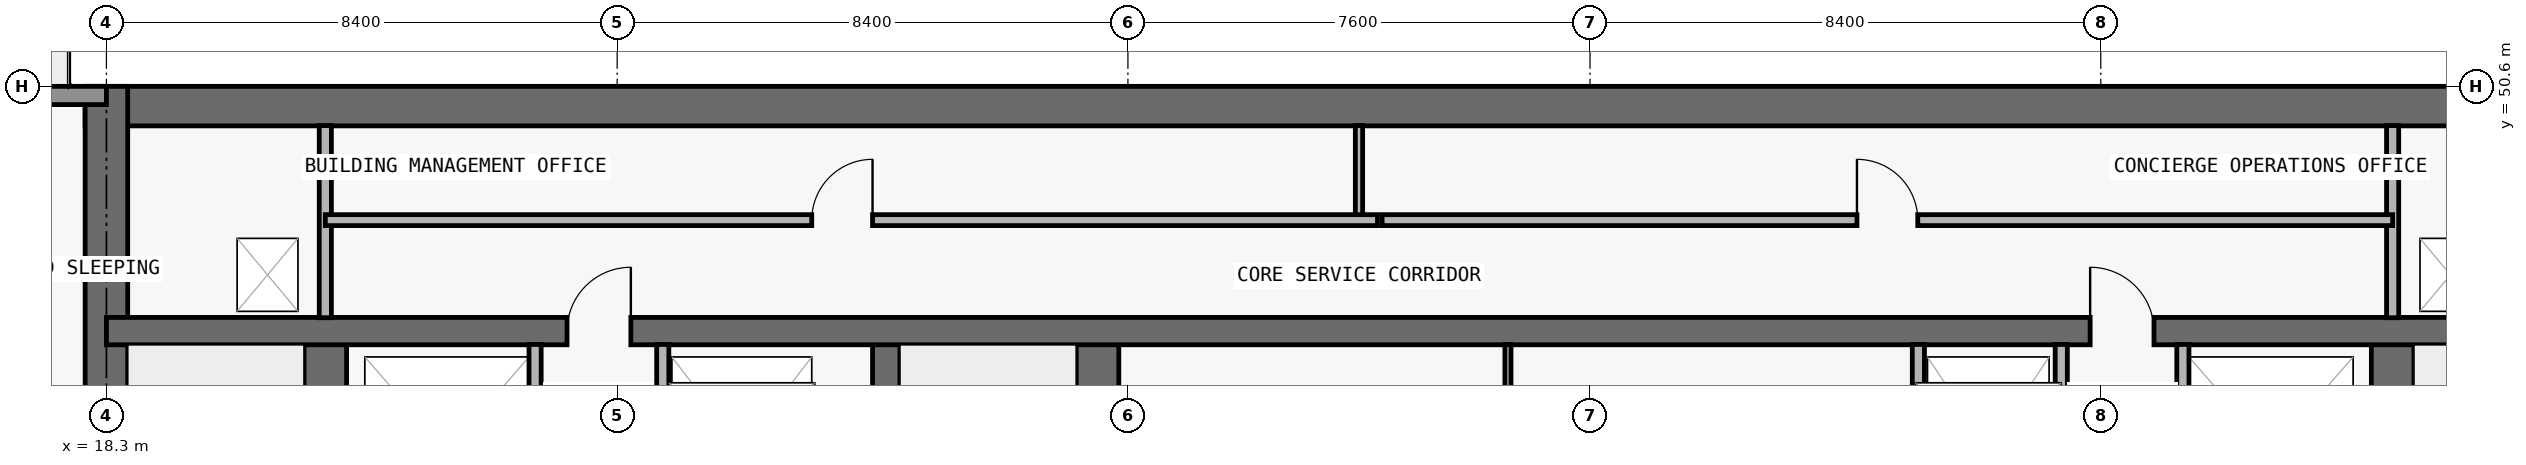
"""IFC4 building model, lengths in metres.
Left out: names, types, materials, properties, quantities, classifications, styles, units other than length and angle.
Written with IfcOpenShell. Run it as: python <this file> out.ifc"""

import sys

from ifc_helpers import new_model, si_unit, direction, frame, frame_2d, origin, place, context, subcontext, project, spatial, rectangle, extrude, element, fill, save


model = new_model("IFC4")
c1 = context("Model", 3, precision=1e-05, world=origin(), true_north=direction((0.0, 1.0)))
c2 = subcontext(c1, "Body", "Model", "MODEL_VIEW")
j1 = project(units=[si_unit("LENGTHUNIT", "METRE"), si_unit("PLANEANGLEUNIT", "RADIAN")], contexts=[c1])
p1 = place(None, origin())
s1 = spatial("IfcSite", under=j1, at=p1, CompositionType="ELEMENT")
p2 = place(p1, origin())
s2 = spatial("IfcBuilding", under=s1, at=p2, CompositionType="ELEMENT")
p3 = place(p2, frame((0.0, 0.0, 218.1)))
s3 = spatial("IfcBuildingStorey", under=s2, at=p3, CompositionType="ELEMENT", Elevation=218.1)
p4 = place(p3, frame((17.95, 50.275, 0.0), z_axis=(0.0, 0.0, 1.0), x_axis=(1.0, 0.0, 0.0)))
e1 = element("IfcWall", 1, at=p4, inside=s3, PredefinedType="SHEAR", context=c2, shape_type="SweptSolid", body=[
    extrude(rectangle(XDim=41.9, YDim=0.65, at=frame_2d((20.95, 0.0))), origin(), (0.0, 0.0, 1.0), 3.0),
])
p5 = place(p3, frame((18.3, 36.65, 0.0), z_axis=(0.0, 0.0, 1.0), x_axis=(0.0, 1.0, 0.0)))
e2 = element("IfcWall", 2, at=p5, inside=s3, PredefinedType="SHEAR", context=c2, shape_type="SweptSolid", body=[
    extrude(rectangle(XDim=13.95, YDim=0.7, at=frame_2d((6.975, 0.0))), origin(), (0.0, 0.0, 1.0), 3.0),
])
p6 = place(p3, frame((21.9, 37.0, 0.0), z_axis=(0.0, 0.0, 1.0), x_axis=(0.0, 1.0, 0.0)))
e3 = element("IfcWall", 3, at=p6, inside=s3, PredefinedType="SHEAR", context=c2, shape_type="SweptSolid", body=[
    extrude(rectangle(XDim=9.575, YDim=0.7, at=frame_2d((4.788, 0.0))), origin(), (0.0, 0.0, 1.0), 3.0),
])
p7 = place(p6, frame((0.55, 0.0, 0.0)))
e4 = element("IfcOpeningElement", 4, at=p7, cuts=e3, PredefinedType="OPENING", context=c2, shape_type="SweptSolid", body=[
    extrude(rectangle(XDim=1.1, YDim=2.15, at=frame_2d((0.55, 1.075))), frame((0.0, 0.36, 0.0), z_axis=(0.0, -1.0, 0.0), x_axis=(1.0, 0.0, 0.0)), (0.0, 0.0, 1.0), 0.72),
])
p8 = place(p3, frame((55.9, 37.0, 0.0), z_axis=(0.0, 0.0, 1.0), x_axis=(0.0, 1.0, 0.0)))
e5 = element("IfcWall", 5, at=p8, inside=s3, PredefinedType="SHEAR", context=c2, shape_type="SweptSolid", body=[
    extrude(rectangle(XDim=9.575, YDim=0.7, at=frame_2d((4.788, 0.0))), origin(), (0.0, 0.0, 1.0), 3.0),
])
p9 = place(p8, frame((0.55, 0.0, 0.0)))
e6 = element("IfcOpeningElement", 6, at=p9, cuts=e5, PredefinedType="OPENING", context=c2, shape_type="SweptSolid", body=[
    extrude(rectangle(XDim=1.1, YDim=2.15, at=frame_2d((0.55, 1.075))), frame((0.0, 0.36, 0.0), z_axis=(0.0, -1.0, 0.0), x_axis=(1.0, 0.0, 0.0)), (0.0, 0.0, 1.0), 0.72),
])
p10 = place(p3, frame((31.125, 37.0, 0.0), z_axis=(0.0, 0.0, 1.0), x_axis=(0.0, 1.0, 0.0)))
e7 = element("IfcWall", 7, at=p10, inside=s3, PredefinedType="SHEAR", context=c2, shape_type="SweptSolid", body=[
    extrude(rectangle(XDim=9.575, YDim=0.45, at=frame_2d((4.788, 0.0))), origin(), (0.0, 0.0, 1.0), 3.0),
])
p11 = place(p3, frame((34.6, 37.0, 0.0), z_axis=(0.0, 0.0, 1.0), x_axis=(0.0, 1.0, 0.0)))
e8 = element("IfcWall", 8, at=p11, inside=s3, PredefinedType="SHEAR", context=c2, shape_type="SweptSolid", body=[
    extrude(rectangle(XDim=9.575, YDim=0.7, at=frame_2d((4.788, 0.0))), origin(), (0.0, 0.0, 1.0), 3.0),
])
p12 = place(p3, frame((18.3, 46.575, 0.0), z_axis=(0.0, 0.0, 1.0), x_axis=(1.0, 0.0, 0.0)))
e9 = element("IfcWall", 9, at=p12, inside=s3, PredefinedType="SHEAR", context=c2, shape_type="SweptSolid", body=[
    extrude(rectangle(XDim=41.2, YDim=0.45, at=frame_2d((20.6, 0.0))), origin(), (0.0, 0.0, 1.0), 3.0),
])
p13 = place(p12, frame((7.575, 0.0, 0.0)))
e10 = element("IfcOpeningElement", 10, at=p13, cuts=e9, PredefinedType="OPENING", context=c2, shape_type="SweptSolid", body=[
    extrude(rectangle(XDim=1.05, YDim=2.15, at=frame_2d((0.525, 1.075))), frame((0.0, 0.235, 0.0), z_axis=(0.0, -1.0, 0.0), x_axis=(1.0, 0.0, 0.0)), (0.0, 0.0, 1.0), 0.47),
])
p14 = place(p12, frame((32.625, 0.0, 0.0)))
e11 = element("IfcOpeningElement", 11, at=p14, cuts=e9, PredefinedType="OPENING", context=c2, shape_type="SweptSolid", body=[
    extrude(rectangle(XDim=1.05, YDim=2.15, at=frame_2d((0.525, 1.075))), frame((0.0, 0.235, 0.0), z_axis=(0.0, -1.0, 0.0), x_axis=(1.0, 0.0, 0.0)), (0.0, 0.0, 1.0), 0.47),
])
p15 = place(p3, frame((10.1, 50.45, 0.0), z_axis=(0.0, 0.0, 1.0), x_axis=(1.0, 0.0, 0.0)))
e12 = element("IfcWall", 12, at=p15, inside=s3, PredefinedType="STANDARD", context=c2, shape_type="SweptSolid", body=[
    extrude(rectangle(XDim=8.2, YDim=0.3, at=frame_2d((4.1, 0.0))), origin(), (0.0, 0.0, 1.0), 3.0),
])
p16 = place(p15, frame((3.1, 0.0, 0.0)))
e13 = element("IfcOpeningElement", 13, at=p16, cuts=e12, PredefinedType="OPENING", context=c2, shape_type="SweptSolid", body=[
    extrude(rectangle(XDim=2.0, YDim=2.3, at=frame_2d((1.0, 1.15))), frame((0.0, 0.16, 0.0), z_axis=(0.0, -1.0, 0.0), x_axis=(1.0, 0.0, 0.0)), (0.0, 0.0, 1.0), 0.32),
])
p17 = place(p3, frame((21.9, 46.795, 0.0), z_axis=(0.0, 0.0, 1.0), x_axis=(0.0, 1.0, 0.0)))
e14 = element("IfcWall", 14, at=p17, inside=s3, PredefinedType="PARTITIONING", context=c2, shape_type="SweptSolid", body=[
    extrude(rectangle(XDim=3.16, YDim=0.2, at=frame_2d((1.58, 0.0))), origin(), (0.0, 0.0, 1.0), 3.0),
])
for number, where, z_axis, x_axis in (
    (15, (25.35, 43.17, 0.0), (0.0, 0.0, 1.0), (0.0, 1.0, 0.0)),
    (16, (27.45, 43.17, 0.0), (0.0, 0.0, 1.0), (0.0, 1.0, 0.0)),
):
    element("IfcWall", number, at=place(p3, frame(where, z_axis=z_axis, x_axis=x_axis)), inside=s3, PredefinedType="PARTITIONING", context=c2, shape_type="SweptSolid", body=[
        extrude(rectangle(XDim=3.185, YDim=0.2, at=frame_2d((1.593, 0.0))), origin(), (0.0, 0.0, 1.0), 3.0),
    ])
p18 = place(p3, frame((38.9, 48.4, 0.0), z_axis=(0.0, 0.0, 1.0), x_axis=(0.0, 1.0, 0.0)))
e17 = element("IfcWall", 17, at=p18, inside=s3, PredefinedType="PARTITIONING", context=c2, shape_type="SweptSolid", body=[
    extrude(rectangle(XDim=1.555, YDim=0.12, at=frame_2d((0.778, 0.0))), origin(), (0.0, 0.0, 1.0), 3.0),
])
p19 = place(p3, frame((41.35, 43.17, 0.0), z_axis=(0.0, 0.0, 1.0), x_axis=(0.0, 1.0, 0.0)))
e18 = element("IfcWall", 18, at=p19, inside=s3, PredefinedType="MOVABLE", context=c2, shape_type="SweptSolid", body=[
    extrude(rectangle(XDim=3.185, YDim=0.1, at=frame_2d((1.593, 0.0))), origin(), (0.0, 0.0, 1.0), 3.0),
])
for number, where, z_axis, x_axis in (
    (19, (48.1, 43.17, 0.0), (0.0, 0.0, 1.0), (0.0, 1.0, 0.0)),
    (20, (50.45, 43.17, 0.0), (0.0, 0.0, 1.0), (0.0, 1.0, 0.0)),
    (21, (52.45, 43.17, 0.0), (0.0, 0.0, 1.0), (0.0, 1.0, 0.0)),
):
    element("IfcWall", number, at=place(p3, frame(where, z_axis=z_axis, x_axis=x_axis)), inside=s3, PredefinedType="PARTITIONING", context=c2, shape_type="SweptSolid", body=[
        extrude(rectangle(XDim=3.185, YDim=0.2, at=frame_2d((1.593, 0.0))), origin(), (0.0, 0.0, 1.0), 3.0),
    ])
p20 = place(p3, frame((55.9, 46.795, 0.0), z_axis=(0.0, 0.0, 1.0), x_axis=(0.0, 1.0, 0.0)))
e22 = element("IfcWall", 22, at=p20, inside=s3, PredefinedType="PARTITIONING", context=c2, shape_type="SweptSolid", body=[
    extrude(rectangle(XDim=3.16, YDim=0.2, at=frame_2d((1.58, 0.0))), origin(), (0.0, 0.0, 1.0), 3.0),
])
p21 = place(p3, frame((21.9, 48.4, 0.0), z_axis=(0.0, 0.0, 1.0), x_axis=(1.0, 0.0, 0.0)))
e23 = element("IfcWall", 23, at=p21, inside=s3, PredefinedType="PARTITIONING", context=c2, shape_type="SweptSolid", body=[
    extrude(rectangle(XDim=17.304, YDim=0.18, at=frame_2d((8.652, 0.0))), origin(), (0.0, 0.0, 1.0), 3.0),
])
p22 = place(p21, frame((8.0, 0.0, 0.0)))
e24 = element("IfcOpeningElement", 24, at=p22, cuts=e23, PredefinedType="OPENING", context=c2, shape_type="SweptSolid", body=[
    extrude(rectangle(XDim=1.0, YDim=2.2, at=frame_2d((0.5, 1.1))), frame((0.0, 0.1, 0.0), z_axis=(0.0, -1.0, 0.0), x_axis=(1.0, 0.0, 0.0)), (0.0, 0.0, 1.0), 0.2),
])
p23 = place(p3, frame((39.28, 48.4, 0.0), z_axis=(0.0, 0.0, 1.0), x_axis=(1.0, 0.0, 0.0)))
e25 = element("IfcWall", 25, at=p23, inside=s3, PredefinedType="PARTITIONING", context=c2, shape_type="SweptSolid", body=[
    extrude(rectangle(XDim=16.62, YDim=0.18, at=frame_2d((8.31, 0.0))), origin(), (0.0, 0.0, 1.0), 3.0),
])
p24 = place(p23, frame((7.81, 0.0, 0.0)))
e26 = element("IfcOpeningElement", 26, at=p24, cuts=e25, PredefinedType="OPENING", context=c2, shape_type="SweptSolid", body=[
    extrude(rectangle(XDim=1.0, YDim=2.2, at=frame_2d((0.5, 1.1))), frame((0.0, 0.1, 0.0), z_axis=(0.0, -1.0, 0.0), x_axis=(1.0, 0.0, 0.0)), (0.0, 0.0, 1.0), 0.2),
])
p25 = place(p13, origin())
e27 = element("IfcDoor", 27, at=p25, inside=s3, OperationType="SINGLE_SWING_RIGHT", PredefinedType="DOOR", context=c2, shape_type="SweptSolid", body=[
    extrude(rectangle(XDim=1.05, YDim=2.15, at=frame_2d((0.525, 1.075))), frame((0.0, 0.025, 0.0), z_axis=(0.0, -1.0, 0.0), x_axis=(1.0, 0.0, 0.0)), (0.0, 0.0, 1.0), 0.05),
])
fill(e10, e27)
p26 = place(p14, origin())
e28 = element("IfcDoor", 28, at=p26, inside=s3, OperationType="SINGLE_SWING_LEFT", PredefinedType="DOOR", context=c2, shape_type="SweptSolid", body=[
    extrude(rectangle(XDim=1.05, YDim=2.15, at=frame_2d((0.525, 1.075))), frame((0.0, 0.025, 0.0), z_axis=(0.0, -1.0, 0.0), x_axis=(1.0, 0.0, 0.0)), (0.0, 0.0, 1.0), 0.05),
])
fill(e11, e28)
p27 = place(p22, origin())
e29 = element("IfcDoor", 29, at=p27, inside=s3, OperationType="SINGLE_SWING_RIGHT", PredefinedType="DOOR", context=c2, shape_type="SweptSolid", body=[
    extrude(rectangle(XDim=1.0, YDim=2.2, at=frame_2d((0.5, 1.1))), frame((0.0, 0.025, 0.0), z_axis=(0.0, -1.0, 0.0), x_axis=(1.0, 0.0, 0.0)), (0.0, 0.0, 1.0), 0.05),
])
fill(e24, e29)
p28 = place(p24, origin())
e30 = element("IfcDoor", 30, at=p28, inside=s3, OperationType="SINGLE_SWING_LEFT", PredefinedType="DOOR", context=c2, shape_type="SweptSolid", body=[
    extrude(rectangle(XDim=1.0, YDim=2.2, at=frame_2d((0.5, 1.1))), frame((0.0, 0.025, 0.0), z_axis=(0.0, -1.0, 0.0), x_axis=(1.0, 0.0, 0.0)), (0.0, 0.0, 1.0), 0.05),
])
fill(e26, e30)
save(model, sys.argv[1])
